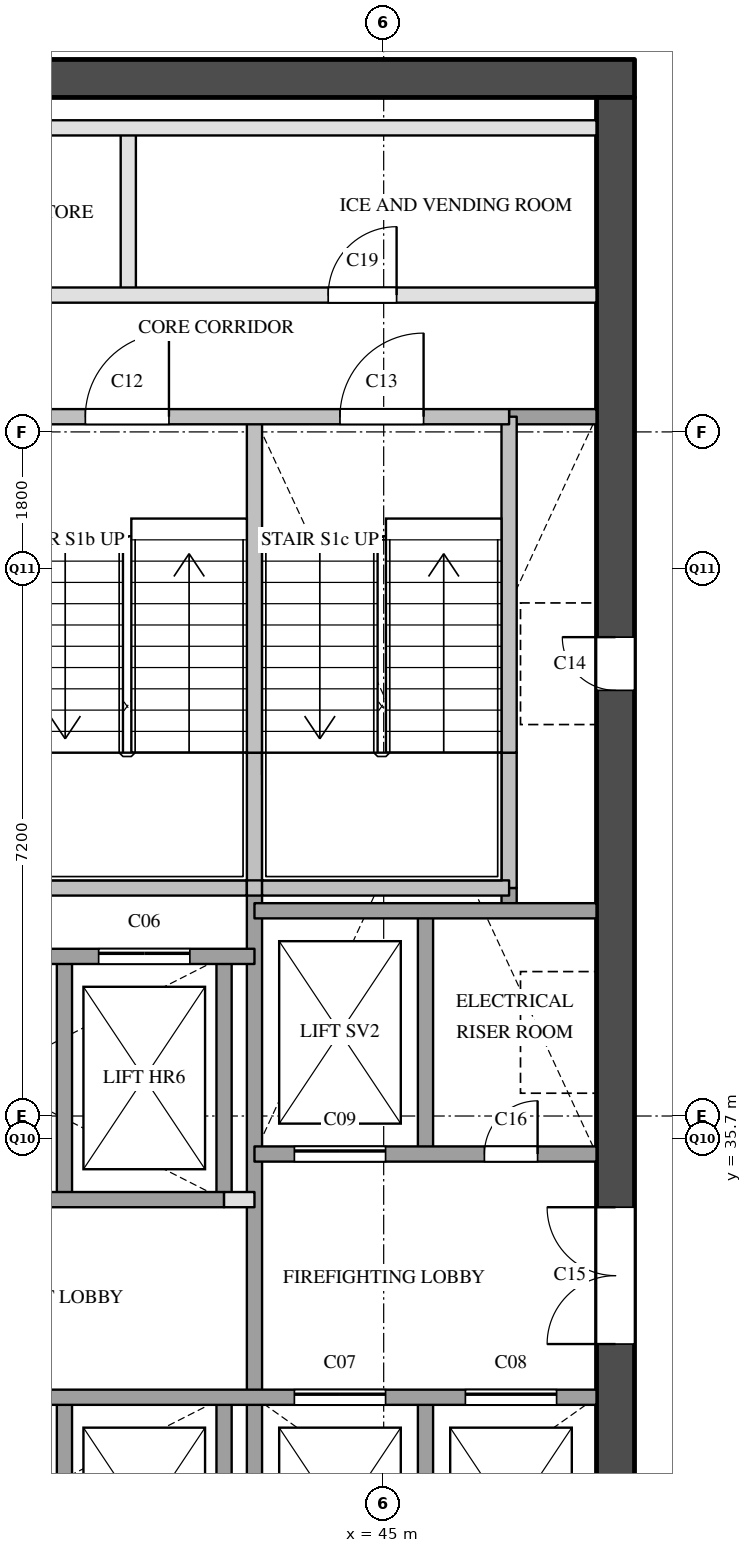
"""IFC4 building model, lengths in metres.
Left out: names, types, materials, properties, quantities, classifications, styles, units other than length and angle.
Written with IfcOpenShell. Run it as: python <this file> out.ifc"""

import sys

from ifc_helpers import new_model, si_unit, direction, frame, frame_2d, origin, place, context, subcontext, project, spatial, rectangle, extrude, element, fill, save


model = new_model("IFC4")
c1 = context("Model", 3, precision=1e-05, world=origin(), true_north=direction((0.0, 1.0)))
c2 = subcontext(c1, "Body", "Model", "MODEL_VIEW")
j1 = project(units=[si_unit("LENGTHUNIT", "METRE"), si_unit("PLANEANGLEUNIT", "RADIAN")], contexts=[c1])
p1 = place(None, origin())
s1 = spatial("IfcSite", under=j1, at=p1, CompositionType="ELEMENT")
p2 = place(p1, origin())
s2 = spatial("IfcBuilding", under=s1, at=p2, CompositionType="ELEMENT")
p3 = place(p2, frame((0.0, 0.0, 146.6)))
s3 = spatial("IfcBuildingStorey", under=s2, at=p3, CompositionType="ELEMENT", Elevation=146.6)
p4 = place(p3, frame((36.1, 49.65, 0.0), z_axis=(0.0, 0.0, 1.0), x_axis=(1.0, 0.0, 0.0)))
e1 = element("IfcWall", 1, at=p4, inside=s3, PredefinedType="SHEAR", context=c2, shape_type="SweptSolid", body=[
    extrude(rectangle(XDim=12.2, YDim=0.5, at=frame_2d((6.1, 0.0))), origin(), (0.0, 0.0, 1.0), 3.6),
])
p5 = place(p3, frame((48.05, 29.1, 0.0), z_axis=(0.0, 0.0, 1.0), x_axis=(0.0, 1.0, 0.0)))
e2 = element("IfcWall", 2, at=p5, inside=s3, PredefinedType="SHEAR", context=c2, shape_type="SweptSolid", body=[
    extrude(rectangle(XDim=20.3, YDim=0.5, at=frame_2d((10.15, 0.0))), origin(), (0.0, 0.0, 1.0), 3.6),
])
p6 = place(p5, frame((12.5, 0.0, 0.0)))
e3 = element("IfcOpeningElement", 3, at=p6, cuts=e2, PredefinedType="OPENING", context=c2, shape_type="SweptSolid", body=[
    extrude(rectangle(XDim=0.7, YDim=2.1, at=frame_2d((0.35, 1.05))), frame((0.0, 0.26, 0.0), z_axis=(0.0, -1.0, 0.0), x_axis=(1.0, 0.0, 0.0)), (0.0, 0.0, 1.0), 0.52),
])
p7 = place(p5, frame((3.9, 0.0, 0.0)))
e4 = element("IfcOpeningElement", 4, at=p7, cuts=e2, PredefinedType="OPENING", context=c2, shape_type="SweptSolid", body=[
    extrude(rectangle(XDim=1.8, YDim=2.1, at=frame_2d((0.9, 1.05))), frame((0.0, 0.26, 0.0), z_axis=(0.0, -1.0, 0.0), x_axis=(1.0, 0.0, 0.0)), (0.0, 0.0, 1.0), 0.52),
])
p8 = place(p3, frame((40.8, 29.1, 0.0), z_axis=(0.0, 0.0, 1.0), x_axis=(0.0, 1.0, 0.0)))
e5 = element("IfcWall", 5, at=p8, inside=s3, PredefinedType="SOLIDWALL", context=c2, shape_type="SweptSolid", body=[
    extrude(rectangle(XDim=3.2, YDim=0.2, at=frame_2d((1.6, 0.0))), origin(), (0.0, 0.0, 1.0), 3.6),
])
p9 = place(p3, frame((40.8, 34.9, 0.0), z_axis=(0.0, 0.0, 1.0), x_axis=(0.0, 1.0, 0.0)))
e6 = element("IfcWall", 6, at=p9, inside=s3, PredefinedType="SOLIDWALL", context=c2, shape_type="SweptSolid", body=[
    extrude(rectangle(XDim=3.2, YDim=0.2, at=frame_2d((1.6, 0.0))), origin(), (0.0, 0.0, 1.0), 3.6),
])
p10 = place(p3, frame((41.64, 46.8, 0.0), z_axis=(0.0, 0.0, 1.0), x_axis=(0.0, 1.0, 0.0)))
e7 = element("IfcWall", 7, at=p10, inside=s3, PredefinedType="PARTITIONING", context=c2, shape_type="SweptSolid", body=[
    extrude(rectangle(XDim=2.2, YDim=0.2, at=frame_2d((1.1, 0.0))), origin(), (0.0, 0.0, 1.0), 3.6),
])
p11 = place(p3, frame((42.9, 29.1, 0.0), z_axis=(0.0, 0.0, 1.0), x_axis=(0.0, 1.0, 0.0)))
e8 = element("IfcWall", 8, at=p11, inside=s3, PredefinedType="SOLIDWALL", context=c2, shape_type="SweptSolid", body=[
    extrude(rectangle(XDim=3.2, YDim=0.2, at=frame_2d((1.6, 0.0))), origin(), (0.0, 0.0, 1.0), 3.6),
])
p12 = place(p3, frame((42.9, 34.9, 0.0), z_axis=(0.0, 0.0, 1.0), x_axis=(0.0, 1.0, 0.0)))
e9 = element("IfcWall", 9, at=p12, inside=s3, PredefinedType="SOLIDWALL", context=c2, shape_type="SweptSolid", body=[
    extrude(rectangle(XDim=3.2, YDim=0.2, at=frame_2d((1.6, 0.0))), origin(), (0.0, 0.0, 1.0), 3.6),
])
p13 = place(p3, frame((43.3, 29.1, 0.0), z_axis=(0.0, 0.0, 1.0), x_axis=(0.0, 1.0, 0.0)))
e10 = element("IfcWall", 10, at=p13, inside=s3, PredefinedType="SOLIDWALL", context=c2, shape_type="SweptSolid", body=[
    extrude(rectangle(XDim=9.9, YDim=0.2, at=frame_2d((4.95, 0.0))), origin(), (0.0, 0.0, 1.0), 3.6),
])
p14 = place(p3, frame((43.3, 39.0, 0.0), z_axis=(0.0, 0.0, 1.0), x_axis=(0.0, 1.0, 0.0)))
e11 = element("IfcWall", 11, at=p14, inside=s3, PredefinedType="SOLIDWALL", context=c2, shape_type="SweptSolid", body=[
    extrude(rectangle(XDim=1.78, YDim=0.2, at=frame_2d((0.89, 0.0))), origin(), (0.0, 0.0, 1.0), 3.6),
])
p15 = place(p3, frame((43.3, 40.78, 0.0), z_axis=(0.0, 0.0, 1.0), x_axis=(0.0, 1.0, 0.0)))
e12 = element("IfcWall", 12, at=p15, inside=s3, PredefinedType="SOLIDWALL", context=c2, shape_type="SweptSolid", body=[
    extrude(rectangle(XDim=4.42, YDim=0.2, at=frame_2d((2.21, 0.0))), origin(), (0.0, 0.0, 1.0), 3.6),
])
for number, where, z_axis, x_axis in (
    (13, (45.55, 29.1, 0.0), (0.0, 0.0, 1.0), (0.0, 1.0, 0.0)),
    (14, (45.55, 35.5, 0.0), (0.0, 0.0, 1.0), (0.0, 1.0, 0.0)),
):
    element("IfcWall", number, at=place(p3, frame(where, z_axis=z_axis, x_axis=x_axis)), inside=s3, PredefinedType="SOLIDWALL", context=c2, shape_type="SweptSolid", body=[
        extrude(rectangle(XDim=3.2, YDim=0.2, at=frame_2d((1.6, 0.0))), origin(), (0.0, 0.0, 1.0), 3.6),
    ])
p16 = place(p3, frame((46.65, 38.7, 0.0), z_axis=(0.0, 0.0, 1.0), x_axis=(0.0, 1.0, 0.0)))
e15 = element("IfcWall", 15, at=p16, inside=s3, PredefinedType="SOLIDWALL", context=c2, shape_type="SweptSolid", body=[
    extrude(rectangle(XDim=0.3, YDim=0.2, at=frame_2d((0.15, 0.0))), origin(), (0.0, 0.0, 1.0), 3.6),
])
p17 = place(p3, frame((46.65, 39.0, 0.0), z_axis=(0.0, 0.0, 1.0), x_axis=(0.0, 1.0, 0.0)))
e16 = element("IfcWall", 16, at=p17, inside=s3, PredefinedType="SOLIDWALL", context=c2, shape_type="SweptSolid", body=[
    extrude(rectangle(XDim=1.78, YDim=0.2, at=frame_2d((0.89, 0.0))), origin(), (0.0, 0.0, 1.0), 3.6),
])
p18 = place(p3, frame((46.65, 40.78, 0.0), z_axis=(0.0, 0.0, 1.0), x_axis=(0.0, 1.0, 0.0)))
e17 = element("IfcWall", 17, at=p18, inside=s3, PredefinedType="SOLIDWALL", context=c2, shape_type="SweptSolid", body=[
    extrude(rectangle(XDim=4.42, YDim=0.2, at=frame_2d((2.21, 0.0))), origin(), (0.0, 0.0, 1.0), 3.6),
])
p19 = place(p3, frame((36.6, 32.3, 0.0), z_axis=(0.0, 0.0, 1.0), x_axis=(1.0, 0.0, 0.0)))
e18 = element("IfcWall", 18, at=p19, inside=s3, PredefinedType="SOLIDWALL", context=c2, shape_type="SweptSolid", body=[
    extrude(rectangle(XDim=11.2, YDim=0.2, at=frame_2d((5.6, 0.0))), origin(), (0.0, 0.0, 1.0), 3.6),
])
p20 = place(p19, frame((7.225, 0.0, 0.0)))
e19 = element("IfcOpeningElement", 19, at=p20, cuts=e18, PredefinedType="OPENING", context=c2, shape_type="SweptSolid", body=[
    extrude(rectangle(XDim=1.2, YDim=2.1, at=frame_2d((0.6, 1.05))), frame((0.0, 0.11, 0.0), z_axis=(0.0, -1.0, 0.0), x_axis=(1.0, 0.0, 0.0)), (0.0, 0.0, 1.0), 0.22),
])
p21 = place(p19, frame((9.475, 0.0, 0.0)))
e20 = element("IfcOpeningElement", 20, at=p21, cuts=e18, PredefinedType="OPENING", context=c2, shape_type="SweptSolid", body=[
    extrude(rectangle(XDim=1.2, YDim=2.1, at=frame_2d((0.6, 1.05))), frame((0.0, 0.11, 0.0), z_axis=(0.0, -1.0, 0.0), x_axis=(1.0, 0.0, 0.0)), (0.0, 0.0, 1.0), 0.22),
])
p22 = place(p3, frame((42.9, 34.9, 0.0), z_axis=(0.0, 0.0, 1.0), x_axis=(1.0, 0.0, 0.0)))
e21 = element("IfcWall", 21, at=p22, inside=s3, PredefinedType="PARTITIONING", context=c2, shape_type="SweptSolid", body=[
    extrude(rectangle(XDim=0.4, YDim=0.2, at=frame_2d((0.2, 0.0))), origin(), (0.0, 0.0, 1.0), 3.6),
])
p23 = place(p3, frame((36.6, 34.9, 0.0), z_axis=(0.0, 0.0, 1.0), x_axis=(1.0, 0.0, 0.0)))
e22 = element("IfcWall", 22, at=p23, inside=s3, PredefinedType="SOLIDWALL", context=c2, shape_type="SweptSolid", body=[
    extrude(rectangle(XDim=6.3, YDim=0.2, at=frame_2d((3.15, 0.0))), origin(), (0.0, 0.0, 1.0), 3.6),
])
p24 = place(p3, frame((43.3, 35.5, 0.0), z_axis=(0.0, 0.0, 1.0), x_axis=(1.0, 0.0, 0.0)))
e23 = element("IfcWall", 23, at=p24, inside=s3, PredefinedType="SOLIDWALL", context=c2, shape_type="SweptSolid", body=[
    extrude(rectangle(XDim=4.5, YDim=0.2, at=frame_2d((2.25, 0.0))), origin(), (0.0, 0.0, 1.0), 3.6),
])
p25 = place(p24, frame((0.525, 0.0, 0.0)))
e24 = element("IfcOpeningElement", 24, at=p25, cuts=e23, PredefinedType="OPENING", context=c2, shape_type="SweptSolid", body=[
    extrude(rectangle(XDim=1.2, YDim=2.1, at=frame_2d((0.6, 1.05))), frame((0.0, 0.11, 0.0), z_axis=(0.0, -1.0, 0.0), x_axis=(1.0, 0.0, 0.0)), (0.0, 0.0, 1.0), 0.22),
])
p26 = place(p24, frame((3.025, 0.0, 0.0)))
e25 = element("IfcOpeningElement", 25, at=p26, cuts=e23, PredefinedType="OPENING", context=c2, shape_type="SweptSolid", body=[
    extrude(rectangle(XDim=0.7, YDim=2.1, at=frame_2d((0.35, 1.05))), frame((0.0, 0.11, 0.0), z_axis=(0.0, -1.0, 0.0), x_axis=(1.0, 0.0, 0.0)), (0.0, 0.0, 1.0), 0.22),
])
p27 = place(p3, frame((36.6, 38.1, 0.0), z_axis=(0.0, 0.0, 1.0), x_axis=(1.0, 0.0, 0.0)))
e26 = element("IfcWall", 26, at=p27, inside=s3, PredefinedType="SOLIDWALL", context=c2, shape_type="SweptSolid", body=[
    extrude(rectangle(XDim=6.7, YDim=0.2, at=frame_2d((3.35, 0.0))), origin(), (0.0, 0.0, 1.0), 3.6),
])
p28 = place(p27, frame((0.45, 0.0, 0.0)))
e27 = element("IfcOpeningElement", 27, at=p28, cuts=e26, PredefinedType="OPENING", context=c2, shape_type="SweptSolid", body=[
    extrude(rectangle(XDim=1.2, YDim=2.1, at=frame_2d((0.6, 1.05))), frame((0.0, 0.11, 0.0), z_axis=(0.0, -1.0, 0.0), x_axis=(1.0, 0.0, 0.0)), (0.0, 0.0, 1.0), 0.22),
])
p29 = place(p27, frame((2.55, 0.0, 0.0)))
e28 = element("IfcOpeningElement", 28, at=p29, cuts=e26, PredefinedType="OPENING", context=c2, shape_type="SweptSolid", body=[
    extrude(rectangle(XDim=1.2, YDim=2.1, at=frame_2d((0.6, 1.05))), frame((0.0, 0.11, 0.0), z_axis=(0.0, -1.0, 0.0), x_axis=(1.0, 0.0, 0.0)), (0.0, 0.0, 1.0), 0.22),
])
p30 = place(p27, frame((4.65, 0.0, 0.0)))
e29 = element("IfcOpeningElement", 29, at=p30, cuts=e26, PredefinedType="OPENING", context=c2, shape_type="SweptSolid", body=[
    extrude(rectangle(XDim=1.2, YDim=2.1, at=frame_2d((0.6, 1.05))), frame((0.0, 0.11, 0.0), z_axis=(0.0, -1.0, 0.0), x_axis=(1.0, 0.0, 0.0)), (0.0, 0.0, 1.0), 0.22),
])
p31 = place(p3, frame((43.3, 38.7, 0.0), z_axis=(0.0, 0.0, 1.0), x_axis=(1.0, 0.0, 0.0)))
e30 = element("IfcWall", 30, at=p31, inside=s3, PredefinedType="SOLIDWALL", context=c2, shape_type="SweptSolid", body=[
    extrude(rectangle(XDim=4.5, YDim=0.2, at=frame_2d((2.25, 0.0))), origin(), (0.0, 0.0, 1.0), 3.6),
])
p32 = place(p3, frame((40.05, 39.0, 0.0), z_axis=(0.0, 0.0, 1.0), x_axis=(1.0, 0.0, 0.0)))
e31 = element("IfcWall", 31, at=p32, inside=s3, PredefinedType="SOLIDWALL", context=c2, shape_type="SweptSolid", body=[
    extrude(rectangle(XDim=3.15, YDim=0.2, at=frame_2d((1.575, 0.0))), origin(), (0.0, 0.0, 1.0), 3.6),
])
p33 = place(p3, frame((43.2, 39.0, 0.0), z_axis=(0.0, 0.0, 1.0), x_axis=(1.0, 0.0, 0.0)))
e32 = element("IfcWall", 32, at=p33, inside=s3, PredefinedType="SOLIDWALL", context=c2, shape_type="SweptSolid", body=[
    extrude(rectangle(XDim=0.2, YDim=0.2, at=frame_2d((0.1, 0.0))), origin(), (0.0, 0.0, 1.0), 3.6),
])
p34 = place(p3, frame((43.4, 39.0, 0.0), z_axis=(0.0, 0.0, 1.0), x_axis=(1.0, 0.0, 0.0)))
e33 = element("IfcWall", 33, at=p34, inside=s3, PredefinedType="SOLIDWALL", context=c2, shape_type="SweptSolid", body=[
    extrude(rectangle(XDim=3.25, YDim=0.2, at=frame_2d((1.625, 0.0))), origin(), (0.0, 0.0, 1.0), 3.6),
])
p35 = place(p3, frame((46.65, 45.2, 0.0), z_axis=(0.0, 0.0, 1.0), x_axis=(1.0, 0.0, 0.0)))
e34 = element("IfcWall", 34, at=p35, inside=s3, PredefinedType="SOLIDWALL", context=c2, shape_type="SweptSolid", body=[
    extrude(rectangle(XDim=1.15, YDim=0.2, at=frame_2d((0.575, 0.0))), origin(), (0.0, 0.0, 1.0), 3.6),
])
p36 = place(p3, frame((36.6, 45.2, 0.0), z_axis=(0.0, 0.0, 1.0), x_axis=(1.0, 0.0, 0.0)))
e35 = element("IfcWall", 35, at=p36, inside=s3, PredefinedType="SOLIDWALL", context=c2, shape_type="SweptSolid", body=[
    extrude(rectangle(XDim=10.05, YDim=0.2, at=frame_2d((5.025, 0.0))), origin(), (0.0, 0.0, 1.0), 3.6),
])
p37 = place(p36, frame((1.125, 0.0, 0.0)))
e36 = element("IfcOpeningElement", 36, at=p37, cuts=e35, PredefinedType="OPENING", context=c2, shape_type="SweptSolid", body=[
    extrude(rectangle(XDim=1.1, YDim=2.1, at=frame_2d((0.55, 1.05))), frame((0.0, 0.11, 0.0), z_axis=(0.0, -1.0, 0.0), x_axis=(1.0, 0.0, 0.0)), (0.0, 0.0, 1.0), 0.22),
])
p38 = place(p36, frame((4.475, 0.0, 0.0)))
e37 = element("IfcOpeningElement", 37, at=p38, cuts=e35, PredefinedType="OPENING", context=c2, shape_type="SweptSolid", body=[
    extrude(rectangle(XDim=1.1, YDim=2.1, at=frame_2d((0.55, 1.05))), frame((0.0, 0.11, 0.0), z_axis=(0.0, -1.0, 0.0), x_axis=(1.0, 0.0, 0.0)), (0.0, 0.0, 1.0), 0.22),
])
p39 = place(p36, frame((7.825, 0.0, 0.0)))
e38 = element("IfcOpeningElement", 38, at=p39, cuts=e35, PredefinedType="OPENING", context=c2, shape_type="SweptSolid", body=[
    extrude(rectangle(XDim=1.1, YDim=2.1, at=frame_2d((0.55, 1.05))), frame((0.0, 0.11, 0.0), z_axis=(0.0, -1.0, 0.0), x_axis=(1.0, 0.0, 0.0)), (0.0, 0.0, 1.0), 0.22),
])
p40 = place(p3, frame((36.6, 46.8, 0.0), z_axis=(0.0, 0.0, 1.0), x_axis=(1.0, 0.0, 0.0)))
e39 = element("IfcWall", 39, at=p40, inside=s3, PredefinedType="PARTITIONING", context=c2, shape_type="SweptSolid", body=[
    extrude(rectangle(XDim=11.2, YDim=0.2, at=frame_2d((5.6, 0.0))), origin(), (0.0, 0.0, 1.0), 3.6),
])
p41 = place(p40, frame((2.07, 0.0, 0.0)))
e40 = element("IfcOpeningElement", 40, at=p41, cuts=e39, PredefinedType="OPENING", context=c2, shape_type="SweptSolid", body=[
    extrude(rectangle(XDim=0.9, YDim=2.1, at=frame_2d((0.45, 1.05))), frame((0.0, 0.11, 0.0), z_axis=(0.0, -1.0, 0.0), x_axis=(1.0, 0.0, 0.0)), (0.0, 0.0, 1.0), 0.22),
])
p42 = place(p40, frame((7.67, 0.0, 0.0)))
e41 = element("IfcOpeningElement", 41, at=p42, cuts=e39, PredefinedType="OPENING", context=c2, shape_type="SweptSolid", body=[
    extrude(rectangle(XDim=0.9, YDim=2.1, at=frame_2d((0.45, 1.05))), frame((0.0, 0.11, 0.0), z_axis=(0.0, -1.0, 0.0), x_axis=(1.0, 0.0, 0.0)), (0.0, 0.0, 1.0), 0.22),
])
p43 = place(p3, frame((36.6, 49.0, 0.0), z_axis=(0.0, 0.0, 1.0), x_axis=(1.0, 0.0, 0.0)))
e42 = element("IfcWall", 42, at=p43, inside=s3, PredefinedType="PARTITIONING", context=c2, shape_type="SweptSolid", body=[
    extrude(rectangle(XDim=11.2, YDim=0.2, at=frame_2d((5.6, 0.0))), origin(), (0.0, 0.0, 1.0), 3.6),
])
p44 = place(p30, origin())
e43 = element("IfcDoor", 43, at=p44, inside=s3, OperationType="SLIDING_TO_LEFT", PredefinedType="DOOR", context=c2, shape_type="SweptSolid", body=[
    extrude(rectangle(XDim=1.2, YDim=2.1, at=frame_2d((0.6, 1.05))), frame((0.0, 0.025, 0.0), z_axis=(0.0, -1.0, 0.0), x_axis=(1.0, 0.0, 0.0)), (0.0, 0.0, 1.0), 0.05),
])
fill(e29, e43)
p45 = place(p20, origin())
e44 = element("IfcDoor", 44, at=p45, inside=s3, OperationType="SLIDING_TO_LEFT", PredefinedType="DOOR", context=c2, shape_type="SweptSolid", body=[
    extrude(rectangle(XDim=1.2, YDim=2.1, at=frame_2d((0.6, 1.05))), frame((0.0, 0.025, 0.0), z_axis=(0.0, -1.0, 0.0), x_axis=(1.0, 0.0, 0.0)), (0.0, 0.0, 1.0), 0.05),
])
fill(e19, e44)
p46 = place(p21, origin())
e45 = element("IfcDoor", 45, at=p46, inside=s3, OperationType="SLIDING_TO_LEFT", PredefinedType="DOOR", context=c2, shape_type="SweptSolid", body=[
    extrude(rectangle(XDim=1.2, YDim=2.1, at=frame_2d((0.6, 1.05))), frame((0.0, 0.025, 0.0), z_axis=(0.0, -1.0, 0.0), x_axis=(1.0, 0.0, 0.0)), (0.0, 0.0, 1.0), 0.05),
])
fill(e20, e45)
p47 = place(p25, origin())
e46 = element("IfcDoor", 46, at=p47, inside=s3, OperationType="SLIDING_TO_LEFT", PredefinedType="DOOR", context=c2, shape_type="SweptSolid", body=[
    extrude(rectangle(XDim=1.2, YDim=2.1, at=frame_2d((0.6, 1.05))), frame((0.0, 0.025, 0.0), z_axis=(0.0, -1.0, 0.0), x_axis=(1.0, 0.0, 0.0)), (0.0, 0.0, 1.0), 0.05),
])
fill(e24, e46)
p48 = place(p38, origin())
e47 = element("IfcDoor", 47, at=p48, inside=s3, OperationType="SINGLE_SWING_RIGHT", PredefinedType="DOOR", context=c2, shape_type="SweptSolid", body=[
    extrude(rectangle(XDim=1.1, YDim=2.1, at=frame_2d((0.55, 1.05))), frame((0.0, 0.025, 0.0), z_axis=(0.0, -1.0, 0.0), x_axis=(1.0, 0.0, 0.0)), (0.0, 0.0, 1.0), 0.05),
])
fill(e37, e47)
p49 = place(p39, origin())
e48 = element("IfcDoor", 48, at=p49, inside=s3, OperationType="SINGLE_SWING_RIGHT", PredefinedType="DOOR", context=c2, shape_type="SweptSolid", body=[
    extrude(rectangle(XDim=1.1, YDim=2.1, at=frame_2d((0.55, 1.05))), frame((0.0, 0.025, 0.0), z_axis=(0.0, -1.0, 0.0), x_axis=(1.0, 0.0, 0.0)), (0.0, 0.0, 1.0), 0.05),
])
fill(e38, e48)
p50 = place(p6, origin())
e49 = element("IfcDoor", 49, at=p50, inside=s3, OperationType="SINGLE_SWING_RIGHT", PredefinedType="DOOR", context=c2, shape_type="SweptSolid", body=[
    extrude(rectangle(XDim=0.7, YDim=2.1, at=frame_2d((0.35, 1.05))), frame((0.0, 0.025, 0.0), z_axis=(0.0, -1.0, 0.0), x_axis=(1.0, 0.0, 0.0)), (0.0, 0.0, 1.0), 0.05),
])
fill(e3, e49)
p51 = place(p7, origin())
e50 = element("IfcDoor", 50, at=p51, inside=s3, OperationType="DOUBLE_DOOR_SINGLE_SWING", PredefinedType="DOOR", context=c2, shape_type="SweptSolid", body=[
    extrude(rectangle(XDim=1.8, YDim=2.1, at=frame_2d((0.9, 1.05))), frame((0.0, 0.025, 0.0), z_axis=(0.0, -1.0, 0.0), x_axis=(1.0, 0.0, 0.0)), (0.0, 0.0, 1.0), 0.05),
])
fill(e4, e50)
p52 = place(p26, origin())
e51 = element("IfcDoor", 51, at=p52, inside=s3, OperationType="SINGLE_SWING_RIGHT", PredefinedType="DOOR", context=c2, shape_type="SweptSolid", body=[
    extrude(rectangle(XDim=0.7, YDim=2.1, at=frame_2d((0.35, 1.05))), frame((0.0, 0.025, 0.0), z_axis=(0.0, -1.0, 0.0), x_axis=(1.0, 0.0, 0.0)), (0.0, 0.0, 1.0), 0.05),
])
fill(e25, e51)
p53 = place(p42, origin())
e52 = element("IfcDoor", 52, at=p53, inside=s3, OperationType="SINGLE_SWING_RIGHT", PredefinedType="DOOR", context=c2, shape_type="SweptSolid", body=[
    extrude(rectangle(XDim=0.9, YDim=2.1, at=frame_2d((0.45, 1.05))), frame((0.0, 0.025, 0.0), z_axis=(0.0, -1.0, 0.0), x_axis=(1.0, 0.0, 0.0)), (0.0, 0.0, 1.0), 0.05),
])
fill(e41, e52)
save(model, sys.argv[1])
